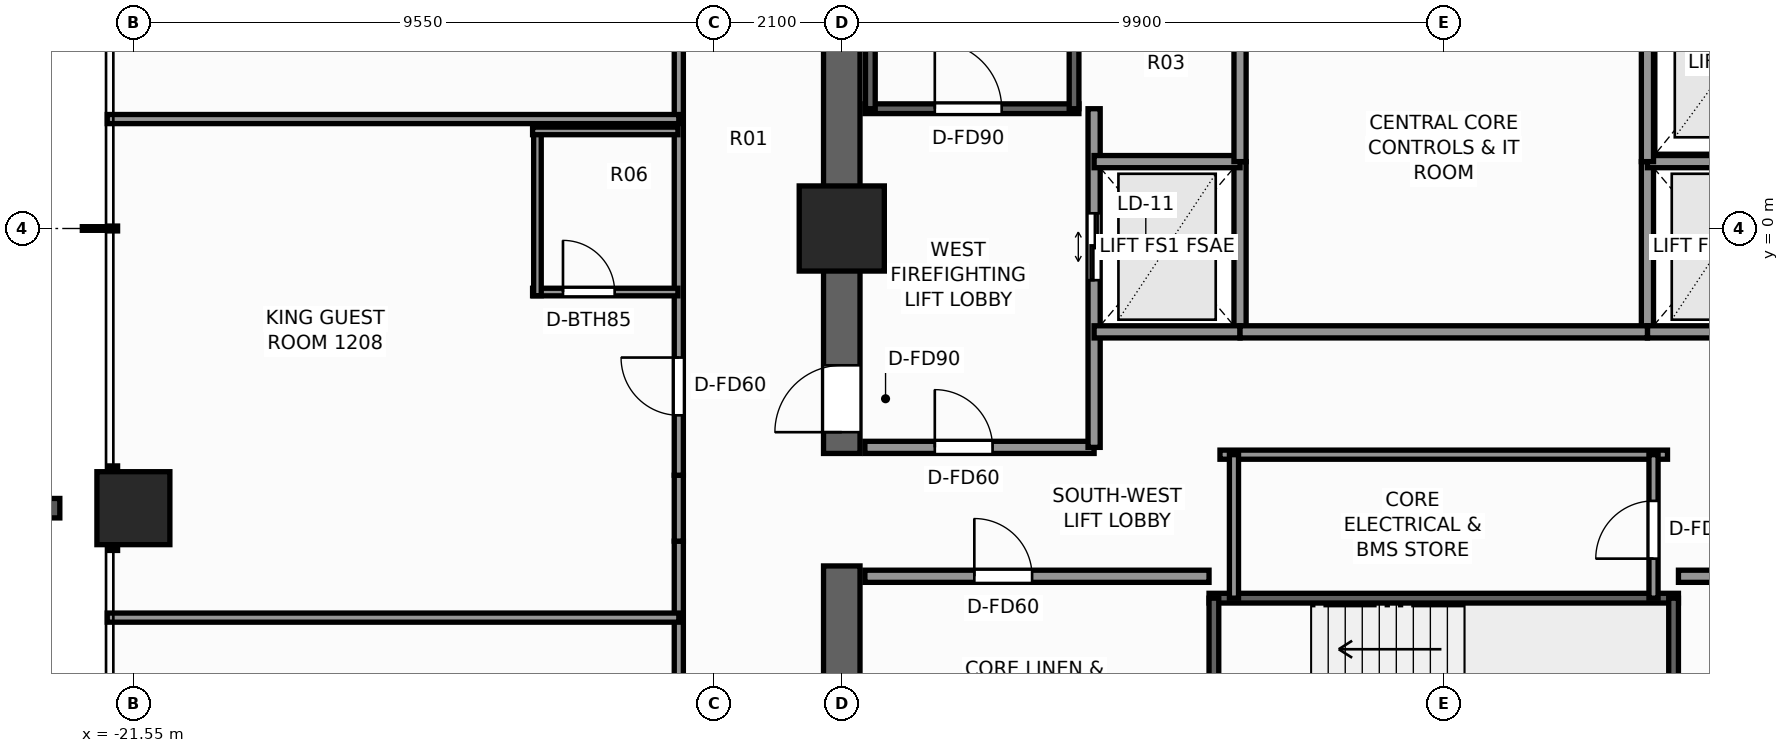
"""IFC4 building model, lengths in metres.
Left out: names, types, materials, properties, quantities, classifications, styles, units other than length and angle.
Written with IfcOpenShell. Run it as: python <this file> out.ifc"""

import sys

from ifc_helpers import new_model, si_unit, direction, frame, frame_2d, origin, origin_2d, place, context, subcontext, project, spatial, rectangle, extrude, element, fill, save


model = new_model("IFC4")
c1 = context("Model", 3, precision=1e-05, world=origin(), true_north=direction((0.0, 1.0)))
c2 = subcontext(c1, "Body", "Model", "MODEL_VIEW")
j1 = project(units=[si_unit("LENGTHUNIT", "METRE"), si_unit("PLANEANGLEUNIT", "RADIAN")], contexts=[c1])
p1 = place(None, origin())
s1 = spatial("IfcSite", under=j1, at=p1, CompositionType="ELEMENT")
p2 = place(p1, origin())
s2 = spatial("IfcBuilding", under=s1, at=p2, CompositionType="ELEMENT")
p3 = place(p2, frame((0.0, 0.0, 43.6)))
s3 = spatial("IfcBuildingStorey", under=s2, at=p3, CompositionType="ELEMENT", Elevation=43.6)
p4 = place(p3, frame((-9.9, -9.6, 0.0), z_axis=(0.0, 0.0, 1.0), x_axis=(0.0, 1.0, 0.0)))
e1 = element("IfcWall", 1, at=p4, inside=s3, PredefinedType="SHEAR", context=c2, shape_type="SweptSolid", body=[
    extrude(rectangle(XDim=4.05, YDim=0.6, at=frame_2d((2.025, 0.0))), origin(), (0.0, 0.0, 1.0), 3.3),
])
p5 = place(p3, frame((-9.9, -3.7, 0.0), z_axis=(0.0, 0.0, 1.0), x_axis=(0.0, 1.0, 0.0)))
e2 = element("IfcWall", 2, at=p5, inside=s3, PredefinedType="SHEAR", context=c2, shape_type="SweptSolid", body=[
    extrude(rectangle(XDim=13.3, YDim=0.6, at=frame_2d((6.65, 0.0))), origin(), (0.0, 0.0, 1.0), 3.3),
])
p6 = place(p5, frame((0.35, 0.0, 0.0)))
e3 = element("IfcOpeningElement", 3, at=p6, cuts=e2, PredefinedType="OPENING", context=c2, shape_type="SweptSolid", body=[
    extrude(rectangle(XDim=1.1, YDim=2.2, at=frame_2d((0.55, 1.1))), frame((0.0, 0.31, 0.0), z_axis=(0.0, -1.0, 0.0), x_axis=(1.0, 0.0, 0.0)), (0.0, 0.0, 1.0), 0.62),
])
p7 = place(p3, frame((-9.9, 0.0, 0.0), z_axis=(0.0, 0.0, 1.0), x_axis=(1.0, 0.0, 0.0)))
e4 = element("IfcColumn", 4, at=p7, inside=s3, PredefinedType="COLUMN", context=c2, shape_type="SweptSolid", body=[
    extrude(rectangle(XDim=1.4, YDim=1.4, at=origin_2d()), origin(), (0.0, 0.0, 1.0), 3.3),
])
p8 = place(p3, frame((-21.55, -4.6, 0.0), z_axis=(0.0, 0.0, 1.0), x_axis=(1.0, 0.0, 0.0)))
e5 = element("IfcColumn", 5, at=p8, inside=s3, PredefinedType="COLUMN", context=c2, shape_type="SweptSolid", body=[
    extrude(rectangle(XDim=1.2, YDim=1.2, at=origin_2d()), origin(), (0.0, 0.0, 1.0), 3.3),
])
p9 = place(p3, frame((-9.52, 1.97, 0.0), z_axis=(0.0, 0.0, 1.0), x_axis=(1.0, 0.0, 0.0)))
e6 = element("IfcWall", 6, at=p9, inside=s3, PredefinedType="SHEAR", context=c2, shape_type="SweptSolid", body=[
    extrude(rectangle(XDim=3.52, YDim=0.16, at=frame_2d((1.76, 0.0))), origin(), (0.0, 0.0, 1.0), 3.3),
])
p10 = place(p9, frame((1.15, 0.0, 0.0)))
e7 = element("IfcOpeningElement", 7, at=p10, cuts=e6, PredefinedType="OPENING", context=c2, shape_type="SweptSolid", body=[
    extrude(rectangle(XDim=1.1, YDim=2.2, at=frame_2d((0.55, 1.1))), frame((0.0, 0.09, 0.0), z_axis=(0.0, -1.0, 0.0), x_axis=(1.0, 0.0, 0.0)), (0.0, 0.0, 1.0), 0.18),
])
for number, where, z_axis, x_axis in (
    (8, (-9.43, 1.97, 0.0), (0.0, 0.0, 1.0), (0.0, 1.0, 0.0)),
    (9, (-6.08, 1.97, 0.0), (0.0, 0.0, 1.0), (0.0, 1.0, 0.0)),
):
    element("IfcWall", number, at=place(p3, frame(where, z_axis=z_axis, x_axis=x_axis)), inside=s3, PredefinedType="SHEAR", context=c2, shape_type="SweptSolid", body=[
        extrude(rectangle(XDim=7.56, YDim=0.16, at=frame_2d((3.78, 0.0))), origin(), (0.0, 0.0, 1.0), 3.3),
    ])
p11 = place(p3, frame((-3.86, -6.08, 0.0), z_axis=(0.0, 0.0, 1.0), x_axis=(1.0, 0.0, 0.0)))
e10 = element("IfcWall", 10, at=p11, inside=s3, PredefinedType="SHEAR", context=c2, shape_type="SweptSolid", body=[
    extrude(rectangle(XDim=7.72, YDim=0.16, at=frame_2d((3.86, 0.0))), origin(), (0.0, 0.0, 1.0), 3.3),
])
for number, where, z_axis, x_axis in (
    (11, (-3.78, -9.43, 0.0), (0.0, 0.0, 1.0), (0.0, 1.0, 0.0)),
    (12, (3.78, -9.43, 0.0), (0.0, 0.0, 1.0), (0.0, 1.0, 0.0)),
):
    element("IfcWall", number, at=place(p3, frame(where, z_axis=z_axis, x_axis=x_axis)), inside=s3, PredefinedType="SHEAR", context=c2, shape_type="SweptSolid", body=[
        extrude(rectangle(XDim=3.35, YDim=0.16, at=frame_2d((1.675, 0.0))), origin(), (0.0, 0.0, 1.0), 3.3),
    ])
p12 = place(p3, frame((-9.52, -3.6, 0.0), z_axis=(0.0, 0.0, 1.0), x_axis=(1.0, 0.0, 0.0)))
e13 = element("IfcWall", 13, at=p12, inside=s3, PredefinedType="SOLIDWALL", context=c2, shape_type="SweptSolid", body=[
    extrude(rectangle(XDim=3.77, YDim=0.2, at=frame_2d((1.885, 0.0))), origin(), (0.0, 0.0, 1.0), 3.06),
])
p13 = place(p12, frame((1.15, 0.0, 0.0)))
e14 = element("IfcOpeningElement", 14, at=p13, cuts=e13, PredefinedType="OPENING", context=c2, shape_type="SweptSolid", body=[
    extrude(rectangle(XDim=0.95, YDim=2.06, at=frame_2d((0.475, 1.03))), frame((0.0, 0.11, 0.0), z_axis=(0.0, -1.0, 0.0), x_axis=(1.0, 0.0, 0.0)), (0.0, 0.0, 1.0), 0.22),
])
p14 = place(p3, frame((-5.75, -3.6, 0.0), z_axis=(0.0, 0.0, 1.0), x_axis=(0.0, 1.0, 0.0)))
e15 = element("IfcWall", 15, at=p14, inside=s3, PredefinedType="SOLIDWALL", context=c2, shape_type="SweptSolid", body=[
    extrude(rectangle(XDim=5.57, YDim=0.2, at=frame_2d((2.785, 0.0))), origin(), (0.0, 0.0, 1.0), 3.06),
])
p15 = place(p14, frame((2.75, 0.0, 0.0)))
e16 = element("IfcOpeningElement", 16, at=p15, cuts=e15, PredefinedType="OPENING", context=c2, shape_type="SweptSolid", body=[
    extrude(rectangle(XDim=1.1, YDim=2.2, at=frame_2d((0.55, 1.1))), frame((0.0, 0.11, 0.0), z_axis=(0.0, -1.0, 0.0), x_axis=(1.0, 0.0, 0.0)), (0.0, 0.0, 1.0), 0.22),
])
p16 = place(p3, frame((-3.35, -1.7, 0.0), z_axis=(0.0, 0.0, 1.0), x_axis=(0.0, 1.0, 0.0)))
e17 = element("IfcWall", 17, at=p16, inside=s3, PredefinedType="SOLIDWALL", context=c2, shape_type="SweptSolid", body=[
    extrude(rectangle(XDim=2.8, YDim=0.2, at=frame_2d((1.4, 0.0))), origin(), (0.0, 0.0, 1.0), 3.06),
])
for number, where, z_axis, x_axis in (
    (18, (-5.75, -1.7, 0.0), (0.0, 0.0, 1.0), (1.0, 0.0, 0.0)),
    (19, (-5.75, 1.1, 0.0), (0.0, 0.0, 1.0), (1.0, 0.0, 0.0)),
):
    element("IfcWall", number, at=place(p3, frame(where, z_axis=z_axis, x_axis=x_axis)), inside=s3, PredefinedType="SOLIDWALL", context=c2, shape_type="SweptSolid", body=[
        extrude(rectangle(XDim=2.4, YDim=0.2, at=frame_2d((1.2, 0.0))), origin(), (0.0, 0.0, 1.0), 3.06),
    ])
p17 = place(p3, frame((3.35, -1.7, 0.0), z_axis=(0.0, 0.0, 1.0), x_axis=(0.0, 1.0, 0.0)))
e20 = element("IfcWall", 20, at=p17, inside=s3, PredefinedType="SOLIDWALL", context=c2, shape_type="SweptSolid", body=[
    extrude(rectangle(XDim=2.8, YDim=0.2, at=frame_2d((1.4, 0.0))), origin(), (0.0, 0.0, 1.0), 3.06),
])
for number, where, z_axis, x_axis in (
    (21, (3.35, -1.7, 0.0), (0.0, 0.0, 1.0), (1.0, 0.0, 0.0)),
    (22, (3.35, 1.1, 0.0), (0.0, 0.0, 1.0), (1.0, 0.0, 0.0)),
):
    element("IfcWall", number, at=place(p3, frame(where, z_axis=z_axis, x_axis=x_axis)), inside=s3, PredefinedType="SOLIDWALL", context=c2, shape_type="SweptSolid", body=[
        extrude(rectangle(XDim=2.4, YDim=0.2, at=frame_2d((1.2, 0.0))), origin(), (0.0, 0.0, 1.0), 3.06),
    ])
p18 = place(p3, frame((-9.52, -5.72, 0.0), z_axis=(0.0, 0.0, 1.0), x_axis=(1.0, 0.0, 0.0)))
e23 = element("IfcWall", 23, at=p18, inside=s3, PredefinedType="SOLIDWALL", context=c2, shape_type="SweptSolid", body=[
    extrude(rectangle(XDim=5.66, YDim=0.2, at=frame_2d((2.83, 0.0))), origin(), (0.0, 0.0, 1.0), 3.06),
])
p19 = place(p18, frame((1.8, 0.0, 0.0)))
e24 = element("IfcOpeningElement", 24, at=p19, cuts=e23, PredefinedType="OPENING", context=c2, shape_type="SweptSolid", body=[
    extrude(rectangle(XDim=0.95, YDim=2.06, at=frame_2d((0.475, 1.03))), frame((0.0, 0.11, 0.0), z_axis=(0.0, -1.0, 0.0), x_axis=(1.0, 0.0, 0.0)), (0.0, 0.0, 1.0), 0.22),
])
p20 = place(p3, frame((3.86, -5.72, 0.0), z_axis=(0.0, 0.0, 1.0), x_axis=(1.0, 0.0, 0.0)))
e25 = element("IfcWall", 25, at=p20, inside=s3, PredefinedType="SOLIDWALL", context=c2, shape_type="SweptSolid", body=[
    extrude(rectangle(XDim=5.66, YDim=0.2, at=frame_2d((2.83, 0.0))), origin(), (0.0, 0.0, 1.0), 3.06),
])
p21 = place(p20, frame((1.8, 0.0, 0.0)))
e26 = element("IfcOpeningElement", 26, at=p21, cuts=e25, PredefinedType="OPENING", context=c2, shape_type="SweptSolid", body=[
    extrude(rectangle(XDim=0.95, YDim=2.06, at=frame_2d((0.475, 1.03))), frame((0.0, 0.11, 0.0), z_axis=(0.0, -1.0, 0.0), x_axis=(1.0, 0.0, 0.0)), (0.0, 0.0, 1.0), 0.22),
])
p22 = place(p3, frame((-3.35, -1.7, 0.0), z_axis=(0.0, 0.0, 1.0), x_axis=(1.0, 0.0, 0.0)))
e27 = element("IfcWall", 27, at=p22, inside=s3, PredefinedType="SOLIDWALL", context=c2, shape_type="SweptSolid", body=[
    extrude(rectangle(XDim=6.7, YDim=0.2, at=frame_2d((3.35, 0.0))), origin(), (0.0, 0.0, 1.0), 3.06),
])
for number, where, z_axis, x_axis in (
    (28, (-3.35, 1.1, 0.0), (0.0, 0.0, 1.0), (0.0, 1.0, 0.0)),
    (29, (3.35, 1.1, 0.0), (0.0, 0.0, 1.0), (0.0, 1.0, 0.0)),
):
    element("IfcWall", number, at=place(p3, frame(where, z_axis=z_axis, x_axis=x_axis)), inside=s3, PredefinedType="SOLIDWALL", context=c2, shape_type="SweptSolid", body=[
        extrude(rectangle(XDim=3.2, YDim=0.2, at=frame_2d((1.6, 0.0))), origin(), (0.0, 0.0, 1.0), 3.06),
    ])
p23 = place(p3, frame((-3.68, -3.72, 0.0), z_axis=(0.0, 0.0, 1.0), x_axis=(1.0, 0.0, 0.0)))
e30 = element("IfcWall", 30, at=p23, inside=s3, PredefinedType="PARTITIONING", context=c2, shape_type="SweptSolid", body=[
    extrude(rectangle(XDim=7.36, YDim=0.15, at=frame_2d((3.68, 0.0))), origin(), (0.0, 0.0, 1.0), 3.06),
])
p24 = place(p3, frame((3.45, -6.08, 0.0), z_axis=(0.0, 0.0, 1.0), x_axis=(0.0, 1.0, 0.0)))
e31 = element("IfcWall", 31, at=p24, inside=s3, PredefinedType="PARTITIONING", context=c2, shape_type="SweptSolid", body=[
    extrude(rectangle(XDim=2.36, YDim=0.15, at=frame_2d((1.18, 0.0))), origin(), (0.0, 0.0, 1.0), 3.06),
])
p25 = place(p24, frame((0.65, 0.0, 0.0)))
e32 = element("IfcOpeningElement", 32, at=p25, cuts=e31, PredefinedType="OPENING", context=c2, shape_type="SweptSolid", body=[
    extrude(rectangle(XDim=0.95, YDim=2.06, at=frame_2d((0.475, 1.03))), frame((0.0, 0.085, 0.0), z_axis=(0.0, -1.0, 0.0), x_axis=(1.0, 0.0, 0.0)), (0.0, 0.0, 1.0), 0.17),
])
p26 = place(p3, frame((-3.45, -6.08, 0.0), z_axis=(0.0, 0.0, 1.0), x_axis=(0.0, 1.0, 0.0)))
e33 = element("IfcWall", 33, at=p26, inside=s3, PredefinedType="PARTITIONING", context=c2, shape_type="SweptSolid", body=[
    extrude(rectangle(XDim=2.36, YDim=0.15, at=frame_2d((1.18, 0.0))), origin(), (0.0, 0.0, 1.0), 3.06),
])
p27 = place(p3, frame((-12.58, -10.323, 0.0), z_axis=(0.0, 0.0, 1.0), x_axis=(0.0, 1.0, 0.0)))
e34 = element("IfcWall", 34, at=p27, inside=s3, PredefinedType="PARTITIONING", context=c2, shape_type="SweptSolid", body=[
    extrude(rectangle(XDim=5.181, YDim=0.15, at=frame_2d((2.59, 0.0))), origin(), (0.0, 0.0, 1.0), 3.06),
])
p28 = place(p27, frame((1.703, 0.0, 0.0)))
e35 = element("IfcOpeningElement", 35, at=p28, cuts=e34, PredefinedType="OPENING", context=c2, shape_type="SweptSolid", body=[
    extrude(rectangle(XDim=0.9, YDim=2.06, at=frame_2d((0.45, 1.03))), frame((0.0, 0.085, 0.0), z_axis=(0.0, -1.0, 0.0), x_axis=(1.0, 0.0, 0.0)), (0.0, 0.0, 1.0), 0.17),
])
p29 = place(p3, frame((-12.58, -5.142, 0.0), z_axis=(0.0, 0.0, 1.0), x_axis=(0.0, 1.0, 0.0)))
e36 = element("IfcWall", 36, at=p29, inside=s3, PredefinedType="PARTITIONING", context=c2, shape_type="SweptSolid", body=[
    extrude(rectangle(XDim=1.084, YDim=0.15, at=frame_2d((0.542, 0.0))), origin(), (0.0, 0.0, 1.0), 1.545),
])
p30 = place(p3, frame((-12.58, -4.058, 0.0), z_axis=(0.0, 0.0, 1.0), x_axis=(0.0, 1.0, 0.0)))
e37 = element("IfcWall", 37, at=p30, inside=s3, PredefinedType="PARTITIONING", context=c2, shape_type="SweptSolid", body=[
    extrude(rectangle(XDim=8.116, YDim=0.15, at=frame_2d((4.058, 0.0))), origin(), (0.0, 0.0, 1.0), 2.349),
])
p31 = place(p30, frame((0.986, 0.0, 0.0)))
e38 = element("IfcOpeningElement", 38, at=p31, cuts=e37, PredefinedType="OPENING", context=c2, shape_type="SweptSolid", body=[
    extrude(rectangle(XDim=0.95, YDim=2.06, at=frame_2d((0.475, 1.03))), frame((0.0, 0.085, 0.0), z_axis=(0.0, -1.0, 0.0), x_axis=(1.0, 0.0, 0.0)), (0.0, 0.0, 1.0), 0.17),
])
for number, where, z_axis, x_axis in (
    (39, (-21.98, -6.4, 0.0), (0.0, 0.0, 1.0), (1.0, 0.0, 0.0)),
    (40, (-21.98, 1.8, 0.0), (0.0, 0.0, 1.0), (1.0, 0.0, 0.0)),
):
    element("IfcWall", number, at=place(p3, frame(where, z_axis=z_axis, x_axis=x_axis)), inside=s3, PredefinedType="PARTITIONING", context=c2, shape_type="SweptSolid", body=[
        extrude(rectangle(XDim=9.4, YDim=0.15, at=frame_2d((4.7, 0.0))), origin(), (0.0, 0.0, 1.0), 2.429),
    ])
p32 = place(p3, frame((-14.985, -1.045, 0.0), z_axis=(0.0, 0.0, 1.0), x_axis=(1.0, 0.0, 0.0)))
e41 = element("IfcWall", 41, at=p32, inside=s3, PredefinedType="PARTITIONING", context=c2, shape_type="SweptSolid", body=[
    extrude(rectangle(XDim=2.39, YDim=0.125, at=frame_2d((1.195, 0.0))), origin(), (0.0, 0.0, 1.0), 3.06),
])
p33 = place(p32, frame((0.5, 0.0, 0.0)))
e42 = element("IfcOpeningElement", 42, at=p33, cuts=e41, PredefinedType="OPENING", context=c2, shape_type="SweptSolid", body=[
    extrude(rectangle(XDim=0.85, YDim=2.03, at=frame_2d((0.425, 1.015))), frame((0.0, 0.073, 0.0), z_axis=(0.0, -1.0, 0.0), x_axis=(1.0, 0.0, 0.0)), (0.0, 0.0, 1.0), 0.145),
])
p34 = place(p3, frame((-14.905, -1.105, 0.0), z_axis=(0.0, 0.0, 1.0), x_axis=(0.0, 1.0, 0.0)))
e43 = element("IfcWall", 43, at=p34, inside=s3, PredefinedType="PARTITIONING", context=c2, shape_type="SweptSolid", body=[
    extrude(rectangle(XDim=2.77, YDim=0.125, at=frame_2d((1.385, 0.0))), origin(), (0.0, 0.0, 1.0), 2.585),
])
p35 = place(p3, frame((-14.985, 1.605, 0.0), z_axis=(0.0, 0.0, 1.0), x_axis=(1.0, 0.0, 0.0)))
e44 = element("IfcWall", 44, at=p35, inside=s3, PredefinedType="PARTITIONING", context=c2, shape_type="SweptSolid", body=[
    extrude(rectangle(XDim=2.39, YDim=0.125, at=frame_2d((1.195, 0.0))), origin(), (0.0, 0.0, 1.0), 3.06),
])
p36 = place(p10, origin())
e45 = element("IfcDoor", 45, at=p36, inside=s3, OperationType="SINGLE_SWING_LEFT", PredefinedType="DOOR", context=c2, shape_type="SweptSolid", body=[
    extrude(rectangle(XDim=1.1, YDim=2.2, at=frame_2d((0.55, 1.1))), frame((0.0, 0.025, 0.0), z_axis=(0.0, -1.0, 0.0), x_axis=(1.0, 0.0, 0.0)), (0.0, 0.0, 1.0), 0.05),
])
fill(e7, e45)
p37 = place(p6, origin())
e46 = element("IfcDoor", 46, at=p37, inside=s3, OperationType="SINGLE_SWING_LEFT", PredefinedType="DOOR", context=c2, shape_type="SweptSolid", body=[
    extrude(rectangle(XDim=1.1, YDim=2.2, at=frame_2d((0.55, 1.1))), frame((0.0, 0.025, 0.0), z_axis=(0.0, -1.0, 0.0), x_axis=(1.0, 0.0, 0.0)), (0.0, 0.0, 1.0), 0.05),
])
fill(e3, e46)
p38 = place(p15, origin())
e47 = element("IfcDoor", 47, at=p38, inside=s3, OperationType="DOUBLE_DOOR_SLIDING", PredefinedType="DOOR", context=c2, shape_type="SweptSolid", body=[
    extrude(rectangle(XDim=1.1, YDim=2.2, at=frame_2d((0.55, 1.1))), frame((0.0, 0.025, 0.0), z_axis=(0.0, -1.0, 0.0), x_axis=(1.0, 0.0, 0.0)), (0.0, 0.0, 1.0), 0.05),
])
fill(e16, e47)
p39 = place(p19, origin())
e48 = element("IfcDoor", 48, at=p39, inside=s3, OperationType="SINGLE_SWING_LEFT", PredefinedType="DOOR", context=c2, shape_type="SweptSolid", body=[
    extrude(rectangle(XDim=0.95, YDim=2.06, at=frame_2d((0.475, 1.03))), frame((0.0, 0.025, 0.0), z_axis=(0.0, -1.0, 0.0), x_axis=(1.0, 0.0, 0.0)), (0.0, 0.0, 1.0), 0.05),
])
fill(e24, e48)
p40 = place(p13, origin())
e49 = element("IfcDoor", 49, at=p40, inside=s3, OperationType="SINGLE_SWING_LEFT", PredefinedType="DOOR", context=c2, shape_type="SweptSolid", body=[
    extrude(rectangle(XDim=0.95, YDim=2.06, at=frame_2d((0.475, 1.03))), frame((0.0, 0.025, 0.0), z_axis=(0.0, -1.0, 0.0), x_axis=(1.0, 0.0, 0.0)), (0.0, 0.0, 1.0), 0.05),
])
fill(e14, e49)
p41 = place(p25, origin())
e50 = element("IfcDoor", 50, at=p41, inside=s3, OperationType="SINGLE_SWING_LEFT", PredefinedType="DOOR", context=c2, shape_type="SweptSolid", body=[
    extrude(rectangle(XDim=0.95, YDim=2.06, at=frame_2d((0.475, 1.03))), frame((0.0, 0.025, 0.0), z_axis=(0.0, -1.0, 0.0), x_axis=(1.0, 0.0, 0.0)), (0.0, 0.0, 1.0), 0.05),
])
fill(e32, e50)
p42 = place(p33, origin())
e51 = element("IfcDoor", 51, at=p42, inside=s3, OperationType="SINGLE_SWING_LEFT", PredefinedType="DOOR", context=c2, shape_type="SweptSolid", body=[
    extrude(rectangle(XDim=0.85, YDim=2.03, at=frame_2d((0.425, 1.015))), frame((0.0, 0.025, 0.0), z_axis=(0.0, -1.0, 0.0), x_axis=(1.0, 0.0, 0.0)), (0.0, 0.0, 1.0), 0.05),
])
fill(e42, e51)
p43 = place(p31, origin())
e52 = element("IfcDoor", 52, at=p43, inside=s3, OperationType="SINGLE_SWING_RIGHT", PredefinedType="DOOR", context=c2, shape_type="SweptSolid", body=[
    extrude(rectangle(XDim=0.95, YDim=2.06, at=frame_2d((0.475, 1.03))), frame((0.0, 0.025, 0.0), z_axis=(0.0, -1.0, 0.0), x_axis=(1.0, 0.0, 0.0)), (0.0, 0.0, 1.0), 0.05),
])
fill(e38, e52)
save(model, sys.argv[1])
